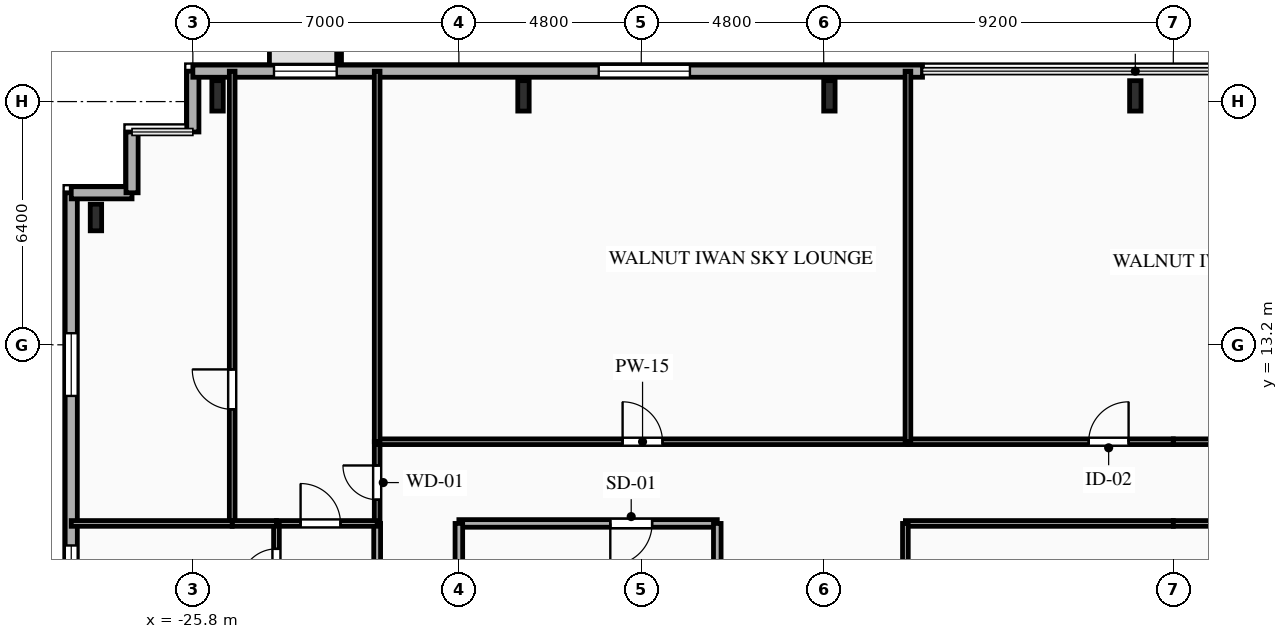
"""IFC4 building model, lengths in metres.
Left out: names, types, materials, properties, quantities, classifications, styles, units other than length and angle.
Written with IfcOpenShell. Run it as: python <this file> out.ifc"""

import sys

from ifc_helpers import new_model, si_unit, direction, frame, frame_2d, origin, origin_2d, place, context, subcontext, project, spatial, rectangle, i_section, extrude, element, fill, save


model = new_model("IFC4")
c1 = context("Model", 3, precision=1e-05, world=origin(), true_north=direction((0.0, 1.0)))
c2 = subcontext(c1, "Body", "Model", "MODEL_VIEW")
j1 = project(units=[si_unit("LENGTHUNIT", "METRE"), si_unit("PLANEANGLEUNIT", "RADIAN")], contexts=[c1])
p1 = place(None, origin())
s1 = spatial("IfcSite", under=j1, at=p1, CompositionType="ELEMENT")
p2 = place(p1, origin())
s2 = spatial("IfcBuilding", under=s1, at=p2, CompositionType="ELEMENT")
p3 = place(p2, frame((0.0, 0.0, 154.45)))
s3 = spatial("IfcBuildingStorey", under=s2, at=p3, CompositionType="ELEMENT", Elevation=154.45)
for number, where, z_axis, x_axis in (
    (1, (-1.0, 19.75, 0.0), (0.0, 0.0, 1.0), (1.0, 0.0, 0.0)),
    (2, (-9.05, 19.75, 0.0), (0.0, 0.0, 1.0), (1.0, 0.0, 0.0)),
    (3, (-17.1, 19.75, 0.0), (0.0, 0.0, 1.0), (1.0, 0.0, 0.0)),
    (4, (-25.15, 19.75, 0.0), (0.0, 0.0, 1.0), (1.0, 0.0, 0.0)),
):
    element("IfcColumn", number, at=place(p3, frame(where, z_axis=z_axis, x_axis=x_axis)), inside=s3, PredefinedType="COLUMN", context=c2, shape_type="SweptSolid", body=[
        extrude(i_section(OverallWidth=0.3, OverallDepth=0.8, WebThickness=0.018, FlangeThickness=0.033, FilletRadius=0.03, at=origin_2d()), origin(), (0.0, 0.0, 1.0), 3.35),
    ])
p4 = place(p3, frame((-28.35, 16.55, 0.0), z_axis=(0.0, 0.0, 1.0), x_axis=(1.0, 0.0, 0.0)))
e5 = element("IfcColumn", 5, at=p4, inside=s3, PredefinedType="COLUMN", context=c2, shape_type="SweptSolid", body=[
    extrude(i_section(OverallWidth=0.3, OverallDepth=0.7, WebThickness=0.017, FlangeThickness=0.032, FilletRadius=0.027, at=origin_2d()), origin(), (0.0, 0.0, 1.0), 3.35),
])
p5 = place(p3, frame((-29.0, -12.4, 0.0), z_axis=(0.0, 0.0, 1.0), x_axis=(0.0, 1.0, 0.0)))
e6 = element("IfcWall", 6, at=p5, inside=s3, PredefinedType="SOLIDWALL", context=c2, shape_type="SweptSolid", body=[
    extrude(rectangle(XDim=29.6, YDim=0.32, at=frame_2d((14.8, 0.0))), origin(), (0.0, 0.0, 1.0), 3.04),
])
p6 = place(p5, frame((2.855, 0.0, 0.85)))
e7 = element("IfcOpeningElement", 7, at=p6, cuts=e6, PredefinedType="OPENING", context=c2, shape_type="SweptSolid", body=[
    extrude(rectangle(XDim=1.65, YDim=1.85, at=frame_2d((0.825, 0.925))), frame((0.0, 0.17, 0.0), z_axis=(0.0, -1.0, 0.0), x_axis=(1.0, 0.0, 0.0)), (0.0, 0.0, 1.0), 0.34),
])
p7 = place(p5, frame((9.865, 0.0, 0.85)))
e8 = element("IfcOpeningElement", 8, at=p7, cuts=e6, PredefinedType="OPENING", context=c2, shape_type="SweptSolid", body=[
    extrude(rectangle(XDim=1.95, YDim=1.85, at=frame_2d((0.975, 0.925))), frame((0.0, 0.17, 0.0), z_axis=(0.0, -1.0, 0.0), x_axis=(1.0, 0.0, 0.0)), (0.0, 0.0, 1.0), 0.34),
])
p8 = place(p5, frame((13.08, 0.0, 0.85)))
e9 = element("IfcOpeningElement", 9, at=p8, cuts=e6, PredefinedType="OPENING", context=c2, shape_type="SweptSolid", body=[
    extrude(rectangle(XDim=1.6, YDim=1.85, at=frame_2d((0.8, 0.925))), frame((0.0, 0.17, 0.0), z_axis=(0.0, -1.0, 0.0), x_axis=(1.0, 0.0, 0.0)), (0.0, 0.0, 1.0), 0.34),
])
p9 = place(p5, frame((15.88, 0.0, 0.85)))
e10 = element("IfcOpeningElement", 10, at=p9, cuts=e6, PredefinedType="OPENING", context=c2, shape_type="SweptSolid", body=[
    extrude(rectangle(XDim=1.6, YDim=1.85, at=frame_2d((0.8, 0.925))), frame((0.0, 0.17, 0.0), z_axis=(0.0, -1.0, 0.0), x_axis=(1.0, 0.0, 0.0)), (0.0, 0.0, 1.0), 0.34),
])
p10 = place(p5, frame((18.72, 0.0, 0.85)))
e11 = element("IfcOpeningElement", 11, at=p10, cuts=e6, PredefinedType="OPENING", context=c2, shape_type="SweptSolid", body=[
    extrude(rectangle(XDim=1.6, YDim=1.85, at=frame_2d((0.8, 0.925))), frame((0.0, 0.17, 0.0), z_axis=(0.0, -1.0, 0.0), x_axis=(1.0, 0.0, 0.0)), (0.0, 0.0, 1.0), 0.34),
])
p11 = place(p5, frame((24.255, 0.0, 0.85)))
e12 = element("IfcOpeningElement", 12, at=p11, cuts=e6, PredefinedType="OPENING", context=c2, shape_type="SweptSolid", body=[
    extrude(rectangle(XDim=1.65, YDim=1.85, at=frame_2d((0.825, 0.925))), frame((0.0, 0.17, 0.0), z_axis=(0.0, -1.0, 0.0), x_axis=(1.0, 0.0, 0.0)), (0.0, 0.0, 1.0), 0.34),
])
for number, where, z_axis, x_axis in (
    (13, (-29.0, 17.2, 0.0), (0.0, 0.0, 1.0), (1.0, 0.0, 0.0)),
    (14, (-27.4, 17.2, 0.0), (0.0, 0.0, 1.0), (0.0, 1.0, 0.0)),
):
    element("IfcWall", number, at=place(p3, frame(where, z_axis=z_axis, x_axis=x_axis)), inside=s3, PredefinedType="SOLIDWALL", context=c2, shape_type="SweptSolid", body=[
        extrude(rectangle(XDim=1.6, YDim=0.32, at=frame_2d((0.8, 0.0))), origin(), (0.0, 0.0, 1.0), 3.04),
    ])
p12 = place(p3, frame((-25.8, 18.8, 0.0), z_axis=(0.0, 0.0, 1.0), x_axis=(0.0, 1.0, 0.0)))
e15 = element("IfcWall", 15, at=p12, inside=s3, PredefinedType="SOLIDWALL", context=c2, shape_type="SweptSolid", body=[
    extrude(rectangle(XDim=1.6, YDim=0.32, at=frame_2d((0.8, 0.0))), origin(), (0.0, 0.0, 1.0), 3.04),
])
p13 = place(p3, frame((-25.8, 20.4, 0.0), z_axis=(0.0, 0.0, 1.0), x_axis=(1.0, 0.0, 0.0)))
e16 = element("IfcWall", 16, at=p13, inside=s3, PredefinedType="SOLIDWALL", context=c2, shape_type="SweptSolid", body=[
    extrude(rectangle(XDim=19.2, YDim=0.32, at=frame_2d((9.6, 0.0))), origin(), (0.0, 0.0, 1.0), 3.04),
])
p14 = place(p13, frame((2.135, 0.0, 0.85)))
e17 = element("IfcOpeningElement", 17, at=p14, cuts=e16, PredefinedType="OPENING", context=c2, shape_type="SweptSolid", body=[
    extrude(rectangle(XDim=1.65, YDim=1.85, at=frame_2d((0.825, 0.925))), frame((0.0, 0.17, 0.0), z_axis=(0.0, -1.0, 0.0), x_axis=(1.0, 0.0, 0.0)), (0.0, 0.0, 1.0), 0.34),
])
p15 = place(p13, frame((10.68, 0.0, 0.85)))
e18 = element("IfcOpeningElement", 18, at=p15, cuts=e16, PredefinedType="OPENING", context=c2, shape_type="SweptSolid", body=[
    extrude(rectangle(XDim=2.4, YDim=1.95, at=frame_2d((1.2, 0.975))), frame((0.0, 0.17, 0.0), z_axis=(0.0, -1.0, 0.0), x_axis=(1.0, 0.0, 0.0)), (0.0, 0.0, 1.0), 0.34),
])
p16 = place(p3, frame((-12.0, 8.5, 0.0), z_axis=(0.0, 0.0, 1.0), x_axis=(-1.0, 0.0, 0.0)))
e19 = element("IfcWall", 19, at=p16, inside=s3, PredefinedType="PARTITIONING", context=c2, shape_type="SweptSolid", body=[
    extrude(rectangle(XDim=6.8, YDim=0.2, at=frame_2d((3.4, 0.0))), origin(), (0.0, 0.0, 1.0), 3.04),
])
p17 = place(p16, frame((1.715, 0.0, 0.0)))
e20 = element("IfcOpeningElement", 20, at=p17, cuts=e19, PredefinedType="OPENING", context=c2, shape_type="SweptSolid", body=[
    extrude(rectangle(XDim=1.1, YDim=2.15, at=frame_2d((0.55, 1.075))), frame((0.0, 0.11, 0.0), z_axis=(0.0, -1.0, 0.0), x_axis=(1.0, 0.0, 0.0)), (0.0, 0.0, 1.0), 0.22),
])
p18 = place(p3, frame((-18.8, 8.5, 0.0), z_axis=(0.0, 0.0, 1.0), x_axis=(0.0, -1.0, 0.0)))
e21 = element("IfcWall", 21, at=p18, inside=s3, PredefinedType="PARTITIONING", context=c2, shape_type="SweptSolid", body=[
    extrude(rectangle(XDim=2.9, YDim=0.2, at=frame_2d((1.45, 0.0))), origin(), (0.0, 0.0, 1.0), 2.525),
])
p19 = place(p3, frame((-12.0, 5.6, 0.0), z_axis=(0.0, 0.0, 1.0), x_axis=(0.0, 1.0, 0.0)))
e22 = element("IfcWall", 22, at=p19, inside=s3, PredefinedType="PARTITIONING", context=c2, shape_type="SweptSolid", body=[
    extrude(rectangle(XDim=2.9, YDim=0.2, at=frame_2d((1.45, 0.0))), origin(), (0.0, 0.0, 1.0), 3.04),
])
p20 = place(p3, frame((-20.95, 8.5, 0.0), z_axis=(0.0, 0.0, 1.0), x_axis=(0.0, 1.0, 0.0)))
e23 = element("IfcWall", 23, at=p20, inside=s3, PredefinedType="PARTITIONING", context=c2, shape_type="SweptSolid", body=[
    extrude(rectangle(XDim=2.15, YDim=0.15, at=frame_2d((1.075, 0.0))), origin(), (0.0, 0.0, 1.0), 3.04),
])
p21 = place(p20, frame((0.625, 0.0, 0.0)))
e24 = element("IfcOpeningElement", 24, at=p21, cuts=e23, PredefinedType="OPENING", context=c2, shape_type="SweptSolid", body=[
    extrude(rectangle(XDim=0.9, YDim=2.1, at=frame_2d((0.45, 1.05))), frame((0.0, 0.085, 0.0), z_axis=(0.0, -1.0, 0.0), x_axis=(1.0, 0.0, 0.0)), (0.0, 0.0, 1.0), 0.17),
])
p22 = place(p3, frame((-20.95, 10.65, 0.0), z_axis=(0.0, 0.0, 1.0), x_axis=(1.0, 0.0, 0.0)))
e25 = element("IfcWall", 25, at=p22, inside=s3, PredefinedType="PARTITIONING", context=c2, shape_type="SweptSolid", body=[
    extrude(rectangle(XDim=13.967, YDim=0.15, at=frame_2d((6.983, 0.0))), origin(), (0.0, 0.0, 1.0), 3.04),
])
p23 = place(p22, frame((6.458, 0.0, 0.0)))
e26 = element("IfcOpeningElement", 26, at=p23, cuts=e25, PredefinedType="OPENING", context=c2, shape_type="SweptSolid", body=[
    extrude(rectangle(XDim=1.05, YDim=2.15, at=frame_2d((0.525, 1.075))), frame((0.0, 0.085, 0.0), z_axis=(0.0, -1.0, 0.0), x_axis=(1.0, 0.0, 0.0)), (0.0, 0.0, 1.0), 0.17),
])
p24 = place(p3, frame((-6.983, 10.65, 0.0), z_axis=(0.0, 0.0, 1.0), x_axis=(1.0, 0.0, 0.0)))
e27 = element("IfcWall", 27, at=p24, inside=s3, PredefinedType="PARTITIONING", context=c2, shape_type="SweptSolid", body=[
    extrude(rectangle(XDim=6.983, YDim=0.15, at=frame_2d((3.491, 0.0))), origin(), (0.0, 0.0, 1.0), 3.04),
])
p25 = place(p24, frame((4.756, 0.0, 0.0)))
e28 = element("IfcOpeningElement", 28, at=p25, cuts=e27, PredefinedType="OPENING", context=c2, shape_type="SweptSolid", body=[
    extrude(rectangle(XDim=1.05, YDim=2.15, at=frame_2d((0.525, 1.075))), frame((0.0, 0.085, 0.0), z_axis=(0.0, -1.0, 0.0), x_axis=(1.0, 0.0, 0.0)), (0.0, 0.0, 1.0), 0.17),
])
p26 = place(p3, frame((0.0, 8.5, 0.0), z_axis=(0.0, 0.0, 1.0), x_axis=(-1.0, 0.0, 0.0)))
e29 = element("IfcWall", 29, at=p26, inside=s3, PredefinedType="PARTITIONING", context=c2, shape_type="SweptSolid", body=[
    extrude(rectangle(XDim=7.05, YDim=0.15, at=frame_2d((3.525, 0.0))), origin(), (0.0, 0.0, 1.0), 3.04),
])
p27 = place(p3, frame((0.0, 10.65, 0.0), z_axis=(0.0, 0.0, 1.0), x_axis=(1.0, 0.0, 0.0)))
e30 = element("IfcWall", 30, at=p27, inside=s3, PredefinedType="PARTITIONING", context=c2, shape_type="SweptSolid", body=[
    extrude(rectangle(XDim=6.983, YDim=0.15, at=frame_2d((3.491, 0.0))), origin(), (0.0, 0.0, 1.0), 3.04),
])
p28 = place(p3, frame((7.05, 8.5, 0.0), z_axis=(0.0, 0.0, 1.0), x_axis=(-1.0, 0.0, 0.0)))
e31 = element("IfcWall", 31, at=p28, inside=s3, PredefinedType="PARTITIONING", context=c2, shape_type="SweptSolid", body=[
    extrude(rectangle(XDim=7.05, YDim=0.15, at=frame_2d((3.525, 0.0))), origin(), (0.0, 0.0, 1.0), 3.04),
])
p29 = place(p3, frame((-20.95, -5.6, 0.0), z_axis=(0.0, 0.0, 1.0), x_axis=(0.0, 1.0, 0.0)))
e32 = element("IfcWall", 32, at=p29, inside=s3, PredefinedType="PARTITIONING", context=c2, shape_type="SweptSolid", body=[
    extrude(rectangle(XDim=14.1, YDim=0.18, at=frame_2d((7.05, 0.0))), origin(), (0.0, 0.0, 1.0), 3.04),
])
p30 = place(p29, frame((5.058, 0.0, 0.0)))
e33 = element("IfcOpeningElement", 33, at=p30, cuts=e32, PredefinedType="OPENING", context=c2, shape_type="SweptSolid", body=[
    extrude(rectangle(XDim=1.0, YDim=2.15, at=frame_2d((0.5, 1.075))), frame((0.0, 0.1, 0.0), z_axis=(0.0, -1.0, 0.0), x_axis=(1.0, 0.0, 0.0)), (0.0, 0.0, 1.0), 0.2),
])
p31 = place(p3, frame((-7.05, 8.5, 0.0), z_axis=(0.0, 0.0, 1.0), x_axis=(0.0, -1.0, 0.0)))
e34 = element("IfcWall", 34, at=p31, inside=s3, PredefinedType="PARTITIONING", context=c2, shape_type="SweptSolid", body=[
    extrude(rectangle(XDim=9.3, YDim=0.15, at=frame_2d((4.65, 0.0))), origin(), (0.0, 0.0, 1.0), 3.04),
])
p32 = place(p3, frame((-23.6, 8.5, 0.0), z_axis=(0.0, 0.0, 1.0), x_axis=(1.0, 0.0, 0.0)))
e35 = element("IfcWall", 35, at=p32, inside=s3, PredefinedType="PARTITIONING", context=c2, shape_type="SweptSolid", body=[
    extrude(rectangle(XDim=2.65, YDim=0.15, at=frame_2d((1.325, 0.0))), origin(), (0.0, 0.0, 1.0), 3.04),
])
p33 = place(p32, frame((0.635, 0.0, 0.0)))
e36 = element("IfcOpeningElement", 36, at=p33, cuts=e35, PredefinedType="OPENING", context=c2, shape_type="SweptSolid", body=[
    extrude(rectangle(XDim=1.05, YDim=2.15, at=frame_2d((0.525, 1.075))), frame((0.0, 0.085, 0.0), z_axis=(0.0, -1.0, 0.0), x_axis=(1.0, 0.0, 0.0)), (0.0, 0.0, 1.0), 0.17),
])
p34 = place(p3, frame((-23.6, 5.68, 0.0), z_axis=(0.0, 0.0, 1.0), x_axis=(0.0, 1.0, 0.0)))
e37 = element("IfcWall", 37, at=p34, inside=s3, PredefinedType="PARTITIONING", context=c2, shape_type="SweptSolid", body=[
    extrude(rectangle(XDim=2.82, YDim=0.15, at=frame_2d((1.41, 0.0))), origin(), (0.0, 0.0, 1.0), 2.695),
])
p35 = place(p34, frame((1.201, 0.0, 0.0)))
e38 = element("IfcOpeningElement", 38, at=p35, cuts=e37, PredefinedType="OPENING", context=c2, shape_type="SweptSolid", body=[
    extrude(rectangle(XDim=0.95, YDim=2.1, at=frame_2d((0.475, 1.05))), frame((0.0, 0.085, 0.0), z_axis=(0.0, -1.0, 0.0), x_axis=(1.0, 0.0, 0.0)), (0.0, 0.0, 1.0), 0.17),
])
p36 = place(p3, frame((-24.765, 8.5, 0.0), z_axis=(0.0, 0.0, 1.0), x_axis=(0.0, 1.0, 0.0)))
e39 = element("IfcWall", 39, at=p36, inside=s3, PredefinedType="PARTITIONING", context=c2, shape_type="SweptSolid", body=[
    extrude(rectangle(XDim=11.9, YDim=0.15, at=frame_2d((5.95, 0.0))), origin(), (0.0, 0.0, 1.0), 3.04),
])
p37 = place(p36, frame((3.002, 0.0, 0.0)))
e40 = element("IfcOpeningElement", 40, at=p37, cuts=e39, PredefinedType="OPENING", context=c2, shape_type="SweptSolid", body=[
    extrude(rectangle(XDim=1.05, YDim=2.15, at=frame_2d((0.525, 1.075))), frame((0.0, 0.085, 0.0), z_axis=(0.0, -1.0, 0.0), x_axis=(1.0, 0.0, 0.0)), (0.0, 0.0, 1.0), 0.17),
])
p38 = place(p3, frame((-23.6, 8.5, 0.0), z_axis=(0.0, 0.0, 1.0), x_axis=(-1.0, 0.0, 0.0)))
e41 = element("IfcWall", 41, at=p38, inside=s3, PredefinedType="PARTITIONING", context=c2, shape_type="SweptSolid", body=[
    extrude(rectangle(XDim=1.165, YDim=0.15, at=frame_2d((0.583, 0.0))), origin(), (0.0, 0.0, 1.0), 3.04),
])
p39 = place(p3, frame((-20.95, 20.4, 0.0), z_axis=(0.0, 0.0, 1.0), x_axis=(0.0, -1.0, 0.0)))
e42 = element("IfcWall", 42, at=p39, inside=s3, PredefinedType="PARTITIONING", context=c2, shape_type="SweptSolid", body=[
    extrude(rectangle(XDim=9.75, YDim=0.15, at=frame_2d((4.875, 0.0))), origin(), (0.0, 0.0, 1.0), 3.04),
])
p40 = place(p3, frame((-24.765, 8.5, 0.0), z_axis=(0.0, 0.0, 1.0), x_axis=(-1.0, 0.0, 0.0)))
e43 = element("IfcWall", 43, at=p40, inside=s3, PredefinedType="PARTITIONING", context=c2, shape_type="SweptSolid", body=[
    extrude(rectangle(XDim=4.235, YDim=0.15, at=frame_2d((2.118, 0.0))), origin(), (0.0, 0.0, 1.0), 3.04),
])
p41 = place(p3, frame((-6.983, 20.4, 0.0), z_axis=(0.0, 0.0, 1.0), x_axis=(0.0, -1.0, 0.0)))
e44 = element("IfcWall", 44, at=p41, inside=s3, PredefinedType="PARTITIONING", context=c2, shape_type="SweptSolid", body=[
    extrude(rectangle(XDim=9.75, YDim=0.15, at=frame_2d((4.875, 0.0))), origin(), (0.0, 0.0, 1.0), 3.04),
])
p42 = place(p10, origin())
e45 = element("IfcWindow", 45, at=p42, inside=s3, PartitioningType="SINGLE_PANEL", PredefinedType="WINDOW", context=c2, shape_type="SweptSolid", body=[
    extrude(rectangle(XDim=1.6, YDim=1.85, at=frame_2d((0.8, 0.925))), frame((0.0, 0.03, 0.0), z_axis=(0.0, -1.0, 0.0), x_axis=(1.0, 0.0, 0.0)), (0.0, 0.0, 1.0), 0.06),
])
fill(e11, e45)
p43 = place(p11, origin())
e46 = element("IfcWindow", 46, at=p43, inside=s3, PartitioningType="SINGLE_PANEL", PredefinedType="WINDOW", context=c2, shape_type="SweptSolid", body=[
    extrude(rectangle(XDim=1.65, YDim=1.85, at=frame_2d((0.825, 0.925))), frame((0.0, 0.03, 0.0), z_axis=(0.0, -1.0, 0.0), x_axis=(1.0, 0.0, 0.0)), (0.0, 0.0, 1.0), 0.06),
])
fill(e12, e46)
p44 = place(p14, origin())
e47 = element("IfcWindow", 47, at=p44, inside=s3, PartitioningType="SINGLE_PANEL", PredefinedType="WINDOW", context=c2, shape_type="SweptSolid", body=[
    extrude(rectangle(XDim=1.65, YDim=1.85, at=frame_2d((0.825, 0.925))), frame((0.0, 0.03, 0.0), z_axis=(0.0, -1.0, 0.0), x_axis=(1.0, 0.0, 0.0)), (0.0, 0.0, 1.0), 0.06),
])
fill(e17, e47)
p45 = place(p15, origin())
e48 = element("IfcWindow", 48, at=p45, inside=s3, PartitioningType="SINGLE_PANEL", PredefinedType="WINDOW", context=c2, shape_type="SweptSolid", body=[
    extrude(rectangle(XDim=2.4, YDim=1.95, at=frame_2d((1.2, 0.975))), frame((0.0, 0.03, 0.0), z_axis=(0.0, -1.0, 0.0), x_axis=(1.0, 0.0, 0.0)), (0.0, 0.0, 1.0), 0.06),
])
fill(e18, e48)
p46 = place(p17, origin())
e49 = element("IfcDoor", 49, at=p46, inside=s3, OperationType="SINGLE_SWING_RIGHT", PredefinedType="DOOR", context=c2, shape_type="SweptSolid", body=[
    extrude(rectangle(XDim=1.1, YDim=2.15, at=frame_2d((0.55, 1.075))), frame((0.0, 0.025, 0.0), z_axis=(0.0, -1.0, 0.0), x_axis=(1.0, 0.0, 0.0)), (0.0, 0.0, 1.0), 0.05),
])
fill(e20, e49)
p47 = place(p21, origin())
e50 = element("IfcDoor", 50, at=p47, inside=s3, OperationType="SINGLE_SWING_RIGHT", PredefinedType="DOOR", context=c2, shape_type="SweptSolid", body=[
    extrude(rectangle(XDim=0.9, YDim=2.1, at=frame_2d((0.45, 1.05))), frame((0.0, 0.025, 0.0), z_axis=(0.0, -1.0, 0.0), x_axis=(1.0, 0.0, 0.0)), (0.0, 0.0, 1.0), 0.05),
])
fill(e24, e50)
p48 = place(p23, origin())
e51 = element("IfcDoor", 51, at=p48, inside=s3, OperationType="SINGLE_SWING_LEFT", PredefinedType="DOOR", context=c2, shape_type="SweptSolid", body=[
    extrude(rectangle(XDim=1.05, YDim=2.15, at=frame_2d((0.525, 1.075))), frame((0.0, 0.025, 0.0), z_axis=(0.0, -1.0, 0.0), x_axis=(1.0, 0.0, 0.0)), (0.0, 0.0, 1.0), 0.05),
])
fill(e26, e51)
p49 = place(p25, origin())
e52 = element("IfcDoor", 52, at=p49, inside=s3, OperationType="SINGLE_SWING_RIGHT", PredefinedType="DOOR", context=c2, shape_type="SweptSolid", body=[
    extrude(rectangle(XDim=1.05, YDim=2.15, at=frame_2d((0.525, 1.075))), frame((0.0, 0.025, 0.0), z_axis=(0.0, -1.0, 0.0), x_axis=(1.0, 0.0, 0.0)), (0.0, 0.0, 1.0), 0.05),
])
fill(e28, e52)
p50 = place(p33, origin())
e53 = element("IfcDoor", 53, at=p50, inside=s3, OperationType="SINGLE_SWING_LEFT", PredefinedType="DOOR", context=c2, shape_type="SweptSolid", body=[
    extrude(rectangle(XDim=1.05, YDim=2.15, at=frame_2d((0.525, 1.075))), frame((0.0, 0.025, 0.0), z_axis=(0.0, -1.0, 0.0), x_axis=(1.0, 0.0, 0.0)), (0.0, 0.0, 1.0), 0.05),
])
fill(e36, e53)
p51 = place(p35, origin())
e54 = element("IfcDoor", 54, at=p51, inside=s3, OperationType="SINGLE_SWING_LEFT", PredefinedType="DOOR", context=c2, shape_type="SweptSolid", body=[
    extrude(rectangle(XDim=0.95, YDim=2.1, at=frame_2d((0.475, 1.05))), frame((0.0, 0.025, 0.0), z_axis=(0.0, -1.0, 0.0), x_axis=(1.0, 0.0, 0.0)), (0.0, 0.0, 1.0), 0.05),
])
fill(e38, e54)
p52 = place(p37, origin())
e55 = element("IfcDoor", 55, at=p52, inside=s3, OperationType="SINGLE_SWING_RIGHT", PredefinedType="DOOR", context=c2, shape_type="SweptSolid", body=[
    extrude(rectangle(XDim=1.05, YDim=2.15, at=frame_2d((0.525, 1.075))), frame((0.0, 0.025, 0.0), z_axis=(0.0, -1.0, 0.0), x_axis=(1.0, 0.0, 0.0)), (0.0, 0.0, 1.0), 0.05),
])
fill(e40, e55)
save(model, sys.argv[1])
